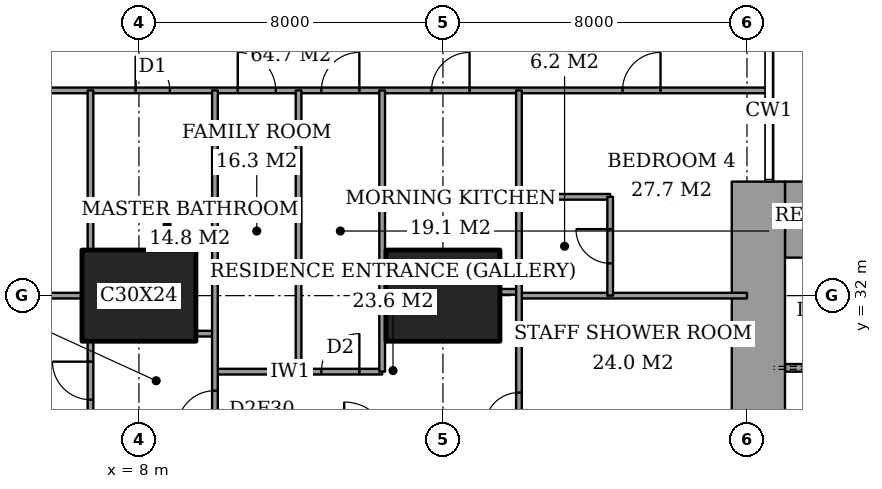
"""IFC4 building model, lengths in metres.
Left out: names, types, materials, properties, quantities, classifications, styles, units other than length and angle.
Written with IfcOpenShell. Run it as: python <this file> out.ifc"""

import sys

from ifc_helpers import new_model, si_unit, direction, frame, frame_2d, origin, origin_2d, place, context, subcontext, project, spatial, rectangle, extrude, element, fill, save


model = new_model("IFC4")
c1 = context("Model", 3, precision=1e-05, world=origin(), true_north=direction((0.0, 1.0)))
c2 = subcontext(c1, "Body", "Model", "MODEL_VIEW")
j1 = project(units=[si_unit("LENGTHUNIT", "METRE"), si_unit("PLANEANGLEUNIT", "RADIAN")], contexts=[c1])
p1 = place(None, origin())
s1 = spatial("IfcSite", under=j1, at=p1, CompositionType="ELEMENT")
p2 = place(p1, origin())
s2 = spatial("IfcBuilding", under=s1, at=p2, CompositionType="ELEMENT")
p3 = place(p2, frame((0.0, 0.0, 185.8)))
s3 = spatial("IfcBuildingStorey", under=s2, at=p3, CompositionType="ELEMENT", Elevation=185.8)
for number, where, z_axis, x_axis in (
    (1, (8.0, 32.0, 0.0), (0.0, 0.0, 1.0), (1.0, 0.0, 0.0)),
    (2, (16.0, 32.0, 0.0), (0.0, 0.0, 1.0), (1.0, 0.0, 0.0)),
):
    element("IfcColumn", number, at=place(p3, frame(where, z_axis=z_axis, x_axis=x_axis)), inside=s3, PredefinedType="COLUMN", context=c2, shape_type="SweptSolid", body=[
        extrude(rectangle(XDim=3.0, YDim=2.4, at=origin_2d()), origin(), (0.0, 0.0, 1.0), 3.6),
    ])
p4 = place(p3, frame((25.0, 34.0, 0.0), z_axis=(0.0, 0.0, 1.0), x_axis=(1.0, 0.0, 0.0)))
e3 = element("IfcWall", 3, at=p4, inside=s3, PredefinedType="SHEAR", context=c2, shape_type="SweptSolid", body=[
    extrude(rectangle(XDim=3.15, YDim=2.0, at=frame_2d((1.575, 0.0))), origin(), (0.0, 0.0, 1.0), 3.6),
])
p5 = place(p3, frame((24.3, 23.15, 0.0), z_axis=(0.0, 0.0, 1.0), x_axis=(0.0, 1.0, 0.0)))
e4 = element("IfcWall", 4, at=p5, inside=s3, PredefinedType="SHEAR", context=c2, shape_type="SweptSolid", body=[
    extrude(rectangle(XDim=11.85, YDim=1.4, at=frame_2d((5.925, 0.0))), origin(), (0.0, 0.0, 1.0), 3.6),
])
p6 = place(p5, frame((0.75, 0.0, 0.0)))
e5 = element("IfcOpeningElement", 5, at=p6, cuts=e4, PredefinedType="OPENING", context=c2, shape_type="SweptSolid", body=[
    extrude(rectangle(XDim=1.8, YDim=2.4, at=frame_2d((0.9, 1.2))), frame((0.0, 0.71, 0.0), z_axis=(0.0, -1.0, 0.0), x_axis=(1.0, 0.0, 0.0)), (0.0, 0.0, 1.0), 1.42),
])
p7 = place(p3, frame((10.0, 30.0, 0.0), z_axis=(0.0, 0.0, 1.0), x_axis=(1.0, 0.0, 0.0)))
e6 = element("IfcWall", 6, at=p7, inside=s3, PredefinedType="PARTITIONING", context=c2, shape_type="SweptSolid", body=[
    extrude(rectangle(XDim=4.4, YDim=0.15, at=frame_2d((2.2, 0.0))), origin(), (0.0, 0.0, 1.0), 3.35),
])
p8 = place(p7, frame((2.8, 0.0, 0.0)))
e7 = element("IfcOpeningElement", 7, at=p8, cuts=e6, PredefinedType="OPENING", context=c2, shape_type="SweptSolid", body=[
    extrude(rectangle(XDim=1.0, YDim=2.1, at=frame_2d((0.5, 1.05))), frame((0.0, 0.085, 0.0), z_axis=(0.0, -1.0, 0.0), x_axis=(1.0, 0.0, 0.0)), (0.0, 0.0, 1.0), 0.17),
])
p9 = place(p3, frame((9.5, 31.0, 0.0), z_axis=(0.0, 0.0, 1.0), x_axis=(1.0, 0.0, 0.0)))
e8 = element("IfcWall", 8, at=p9, inside=s3, PredefinedType="PARTITIONING", context=c2, shape_type="SweptSolid", body=[
    extrude(rectangle(XDim=0.5, YDim=0.15, at=frame_2d((0.25, 0.0))), origin(), (0.0, 0.0, 1.0), 3.35),
])
p10 = place(p3, frame((1.25, 32.0, 0.0), z_axis=(0.0, 0.0, 1.0), x_axis=(1.0, 0.0, 0.0)))
e9 = element("IfcWall", 9, at=p10, inside=s3, PredefinedType="PARTITIONING", context=c2, shape_type="SweptSolid", body=[
    extrude(rectangle(XDim=5.25, YDim=0.15, at=frame_2d((2.625, 0.0))), origin(), (0.0, 0.0, 1.0), 2.634),
])
p11 = place(p3, frame((18.0, 32.0, 0.0), z_axis=(0.0, 0.0, 1.0), x_axis=(1.0, 0.0, 0.0)))
e10 = element("IfcWall", 10, at=p11, inside=s3, PredefinedType="PARTITIONING", context=c2, shape_type="SweptSolid", body=[
    extrude(rectangle(XDim=6.0, YDim=0.15, at=frame_2d((3.0, 0.0))), origin(), (0.0, 0.0, 1.0), 2.634),
])
p12 = place(p3, frame((17.5, 32.1, 0.0), z_axis=(0.0, 0.0, 1.0), x_axis=(1.0, 0.0, 0.0)))
e11 = element("IfcWall", 11, at=p12, inside=s3, PredefinedType="PARTITIONING", context=c2, shape_type="SweptSolid", body=[
    extrude(rectangle(XDim=0.5, YDim=0.15, at=frame_2d((0.25, 0.0))), origin(), (0.0, 0.0, 1.0), 2.634),
])
p13 = place(p3, frame((18.0, 34.6, 0.0), z_axis=(0.0, 0.0, 1.0), x_axis=(1.0, 0.0, 0.0)))
e12 = element("IfcWall", 12, at=p13, inside=s3, PredefinedType="PARTITIONING", context=c2, shape_type="SweptSolid", body=[
    extrude(rectangle(XDim=2.4, YDim=0.15, at=frame_2d((1.2, 0.0))), origin(), (0.0, 0.0, 1.0), 3.35),
])
p14 = place(p3, frame((-0.45, 37.4, 0.0), z_axis=(0.0, 0.0, 1.0), x_axis=(1.0, 0.0, 0.0)))
e13 = element("IfcWall", 13, at=p14, inside=s3, PredefinedType="PARTITIONING", context=c2, shape_type="SweptSolid", body=[
    extrude(rectangle(XDim=25.011, YDim=0.15, at=frame_2d((12.505, 0.0))), origin(), (0.0, 0.0, 1.0), 3.35),
])
p15 = place(p14, frame((13.25, 0.0, 0.0)))
e14 = element("IfcOpeningElement", 14, at=p15, cuts=e13, PredefinedType="OPENING", context=c2, shape_type="SweptSolid", body=[
    extrude(rectangle(XDim=1.0, YDim=2.1, at=frame_2d((0.5, 1.05))), frame((0.0, 0.085, 0.0), z_axis=(0.0, -1.0, 0.0), x_axis=(1.0, 0.0, 0.0)), (0.0, 0.0, 1.0), 0.17),
])
p16 = place(p14, frame((3.087, 0.0, 0.0)))
e15 = element("IfcOpeningElement", 15, at=p16, cuts=e13, PredefinedType="OPENING", context=c2, shape_type="SweptSolid", body=[
    extrude(rectangle(XDim=1.0, YDim=2.1, at=frame_2d((0.5, 1.05))), frame((0.0, 0.085, 0.0), z_axis=(0.0, -1.0, 0.0), x_axis=(1.0, 0.0, 0.0)), (0.0, 0.0, 1.0), 0.17),
])
p17 = place(p14, frame((8.363, 0.0, 0.0)))
e16 = element("IfcOpeningElement", 16, at=p17, cuts=e13, PredefinedType="OPENING", context=c2, shape_type="SweptSolid", body=[
    extrude(rectangle(XDim=0.9, YDim=2.1, at=frame_2d((0.45, 1.05))), frame((0.0, 0.085, 0.0), z_axis=(0.0, -1.0, 0.0), x_axis=(1.0, 0.0, 0.0)), (0.0, 0.0, 1.0), 0.17),
])
p18 = place(p14, frame((11.05, 0.0, 0.0)))
e17 = element("IfcOpeningElement", 17, at=p18, cuts=e13, PredefinedType="OPENING", context=c2, shape_type="SweptSolid", body=[
    extrude(rectangle(XDim=1.0, YDim=2.1, at=frame_2d((0.5, 1.05))), frame((0.0, 0.085, 0.0), z_axis=(0.0, -1.0, 0.0), x_axis=(1.0, 0.0, 0.0)), (0.0, 0.0, 1.0), 0.17),
])
p19 = place(p14, frame((16.15, 0.0, 0.0)))
e18 = element("IfcOpeningElement", 18, at=p19, cuts=e13, PredefinedType="OPENING", context=c2, shape_type="SweptSolid", body=[
    extrude(rectangle(XDim=1.0, YDim=2.1, at=frame_2d((0.5, 1.05))), frame((0.0, 0.085, 0.0), z_axis=(0.0, -1.0, 0.0), x_axis=(1.0, 0.0, 0.0)), (0.0, 0.0, 1.0), 0.17),
])
p20 = place(p14, frame((21.175, 0.0, 0.0)))
e19 = element("IfcOpeningElement", 19, at=p20, cuts=e13, PredefinedType="OPENING", context=c2, shape_type="SweptSolid", body=[
    extrude(rectangle(XDim=1.0, YDim=2.1, at=frame_2d((0.5, 1.05))), frame((0.0, 0.085, 0.0), z_axis=(0.0, -1.0, 0.0), x_axis=(1.0, 0.0, 0.0)), (0.0, 0.0, 1.0), 0.17),
])
p21 = place(p3, frame((6.725, 28.35, 0.0), z_axis=(0.0, 0.0, 1.0), x_axis=(0.0, 1.0, 0.0)))
e20 = element("IfcWall", 20, at=p21, inside=s3, PredefinedType="PARTITIONING", context=c2, shape_type="SweptSolid", body=[
    extrude(rectangle(XDim=2.45, YDim=0.15, at=frame_2d((1.225, 0.0))), origin(), (0.0, 0.0, 1.0), 3.35),
])
p22 = place(p21, frame((0.913, 0.0, 0.0)))
e21 = element("IfcOpeningElement", 21, at=p22, cuts=e20, PredefinedType="OPENING", context=c2, shape_type="SweptSolid", body=[
    extrude(rectangle(XDim=1.0, YDim=2.1, at=frame_2d((0.5, 1.05))), frame((0.0, 0.085, 0.0), z_axis=(0.0, -1.0, 0.0), x_axis=(1.0, 0.0, 0.0)), (0.0, 0.0, 1.0), 0.17),
])
p23 = place(p3, frame((6.725, 33.2, 0.0), z_axis=(0.0, 0.0, 1.0), x_axis=(0.0, 1.0, 0.0)))
e22 = element("IfcWall", 22, at=p23, inside=s3, PredefinedType="PARTITIONING", context=c2, shape_type="SweptSolid", body=[
    extrude(rectangle(XDim=4.2, YDim=0.15, at=frame_2d((2.1, 0.0))), origin(), (0.0, 0.0, 1.0), 3.35),
])
p24 = place(p3, frame((10.0, 28.0, 0.0), z_axis=(0.0, 0.0, 1.0), x_axis=(0.0, 1.0, 0.0)))
e23 = element("IfcWall", 23, at=p24, inside=s3, PredefinedType="PARTITIONING", context=c2, shape_type="SweptSolid", body=[
    extrude(rectangle(XDim=9.4, YDim=0.15, at=frame_2d((4.7, 0.0))), origin(), (0.0, 0.0, 1.0), 3.35),
])
p25 = place(p24, frame((0.5, 0.0, 0.0)))
e24 = element("IfcOpeningElement", 24, at=p25, cuts=e23, PredefinedType="OPENING", context=c2, shape_type="SweptSolid", body=[
    extrude(rectangle(XDim=1.0, YDim=2.1, at=frame_2d((0.5, 1.05))), frame((0.0, 0.085, 0.0), z_axis=(0.0, -1.0, 0.0), x_axis=(1.0, 0.0, 0.0)), (0.0, 0.0, 1.0), 0.17),
])
for number, where, z_axis, x_axis in (
    (25, (12.2, 30.0, 0.0), (0.0, 0.0, 1.0), (0.0, 1.0, 0.0)),
    (26, (14.4, 30.0, 0.0), (0.0, 0.0, 1.0), (0.0, 1.0, 0.0)),
):
    element("IfcWall", number, at=place(p3, frame(where, z_axis=z_axis, x_axis=x_axis)), inside=s3, PredefinedType="PARTITIONING", context=c2, shape_type="SweptSolid", body=[
        extrude(rectangle(XDim=7.4, YDim=0.15, at=frame_2d((3.7, 0.0))), origin(), (0.0, 0.0, 1.0), 3.35),
    ])
p26 = place(p3, frame((18.0, 28.0, 0.0), z_axis=(0.0, 0.0, 1.0), x_axis=(0.0, 1.0, 0.0)))
e27 = element("IfcWall", 27, at=p26, inside=s3, PredefinedType="PARTITIONING", context=c2, shape_type="SweptSolid", body=[
    extrude(rectangle(XDim=9.4, YDim=0.15, at=frame_2d((4.7, 0.0))), origin(), (0.0, 0.0, 1.0), 3.35),
])
p27 = place(p26, frame((0.55, 0.0, 0.0)))
e28 = element("IfcOpeningElement", 28, at=p27, cuts=e27, PredefinedType="OPENING", context=c2, shape_type="SweptSolid", body=[
    extrude(rectangle(XDim=0.9, YDim=2.1, at=frame_2d((0.45, 1.05))), frame((0.0, 0.085, 0.0), z_axis=(0.0, -1.0, 0.0), x_axis=(1.0, 0.0, 0.0)), (0.0, 0.0, 1.0), 0.17),
])
p28 = place(p3, frame((20.4, 32.0, 0.0), z_axis=(0.0, 0.0, 1.0), x_axis=(0.0, 1.0, 0.0)))
e29 = element("IfcWall", 29, at=p28, inside=s3, PredefinedType="PARTITIONING", context=c2, shape_type="SweptSolid", body=[
    extrude(rectangle(XDim=2.6, YDim=0.15, at=frame_2d((1.3, 0.0))), origin(), (0.0, 0.0, 1.0), 3.35),
])
p29 = place(p28, frame((0.85, 0.0, 0.0)))
e30 = element("IfcOpeningElement", 30, at=p29, cuts=e29, PredefinedType="OPENING", context=c2, shape_type="SweptSolid", body=[
    extrude(rectangle(XDim=0.9, YDim=2.1, at=frame_2d((0.45, 1.05))), frame((0.0, 0.085, 0.0), z_axis=(0.0, -1.0, 0.0), x_axis=(1.0, 0.0, 0.0)), (0.0, 0.0, 1.0), 0.17),
])
p30 = place(p3, frame((25.0, 30.1, 0.0), z_axis=(0.0, 0.0, 1.0), x_axis=(1.0, 0.0, 0.0)))
e31 = element("IfcWall", 31, at=p30, inside=s3, PredefinedType="PARTITIONING", context=c2, shape_type="SweptSolid", body=[
    extrude(rectangle(XDim=12.7, YDim=0.2, at=frame_2d((6.35, 0.0))), origin(), (0.0, 0.0, 1.0), 3.6),
])
p31 = place(p30, frame((4.25, 0.0, 0.0)))
e32 = element("IfcOpeningElement", 32, at=p31, cuts=e31, PredefinedType="OPENING", context=c2, shape_type="SweptSolid", body=[
    extrude(rectangle(XDim=1.1, YDim=2.1, at=frame_2d((0.55, 1.05))), frame((0.0, 0.11, 0.0), z_axis=(0.0, -1.0, 0.0), x_axis=(1.0, 0.0, 0.0)), (0.0, 0.0, 1.0), 0.22),
])
p32 = place(p30, frame((7.45, 0.0, 0.0)))
e33 = element("IfcOpeningElement", 33, at=p32, cuts=e31, PredefinedType="OPENING", context=c2, shape_type="SweptSolid", body=[
    extrude(rectangle(XDim=1.1, YDim=2.1, at=frame_2d((0.55, 1.05))), frame((0.0, 0.11, 0.0), z_axis=(0.0, -1.0, 0.0), x_axis=(1.0, 0.0, 0.0)), (0.0, 0.0, 1.0), 0.22),
])
p33 = place(p30, frame((10.65, 0.0, 0.0)))
e34 = element("IfcOpeningElement", 34, at=p33, cuts=e31, PredefinedType="OPENING", context=c2, shape_type="SweptSolid", body=[
    extrude(rectangle(XDim=1.1, YDim=2.1, at=frame_2d((0.55, 1.05))), frame((0.0, 0.11, 0.0), z_axis=(0.0, -1.0, 0.0), x_axis=(1.0, 0.0, 0.0)), (0.0, 0.0, 1.0), 0.22),
])
p34 = place(p30, frame((0.9, 0.0, 0.0)))
e35 = element("IfcOpeningElement", 35, at=p34, cuts=e31, PredefinedType="OPENING", context=c2, shape_type="SweptSolid", body=[
    extrude(rectangle(XDim=1.2, YDim=2.1, at=frame_2d((0.6, 1.05))), frame((0.0, 0.11, 0.0), z_axis=(0.0, -1.0, 0.0), x_axis=(1.0, 0.0, 0.0)), (0.0, 0.0, 1.0), 0.22),
])
p35 = place(p15, origin())
e36 = element("IfcDoor", 36, at=p35, inside=s3, OperationType="SINGLE_SWING_LEFT", PredefinedType="DOOR", context=c2, shape_type="SweptSolid", body=[
    extrude(rectangle(XDim=1.0, YDim=2.1, at=frame_2d((0.5, 1.05))), frame((0.0, 0.025, 0.0), z_axis=(0.0, -1.0, 0.0), x_axis=(1.0, 0.0, 0.0)), (0.0, 0.0, 1.0), 0.05),
])
fill(e14, e36)
p36 = place(p22, origin())
e37 = element("IfcDoor", 37, at=p36, inside=s3, OperationType="SINGLE_SWING_LEFT", PredefinedType="DOOR", context=c2, shape_type="SweptSolid", body=[
    extrude(rectangle(XDim=1.0, YDim=2.1, at=frame_2d((0.5, 1.05))), frame((0.0, 0.025, 0.0), z_axis=(0.0, -1.0, 0.0), x_axis=(1.0, 0.0, 0.0)), (0.0, 0.0, 1.0), 0.05),
])
fill(e21, e37)
p37 = place(p17, origin())
e38 = element("IfcDoor", 38, at=p37, inside=s3, OperationType="SINGLE_SWING_RIGHT", PredefinedType="DOOR", context=c2, shape_type="SweptSolid", body=[
    extrude(rectangle(XDim=0.9, YDim=2.1, at=frame_2d((0.45, 1.05))), frame((0.0, 0.025, 0.0), z_axis=(0.0, -1.0, 0.0), x_axis=(1.0, 0.0, 0.0)), (0.0, 0.0, 1.0), 0.05),
])
fill(e16, e38)
p38 = place(p25, origin())
e39 = element("IfcDoor", 39, at=p38, inside=s3, OperationType="SINGLE_SWING_RIGHT", PredefinedType="DOOR", context=c2, shape_type="SweptSolid", body=[
    extrude(rectangle(XDim=1.0, YDim=2.1, at=frame_2d((0.5, 1.05))), frame((0.0, 0.025, 0.0), z_axis=(0.0, -1.0, 0.0), x_axis=(1.0, 0.0, 0.0)), (0.0, 0.0, 1.0), 0.05),
])
fill(e24, e39)
p39 = place(p18, origin())
e40 = element("IfcDoor", 40, at=p39, inside=s3, OperationType="SINGLE_SWING_RIGHT", PredefinedType="DOOR", context=c2, shape_type="SweptSolid", body=[
    extrude(rectangle(XDim=1.0, YDim=2.1, at=frame_2d((0.5, 1.05))), frame((0.0, 0.025, 0.0), z_axis=(0.0, -1.0, 0.0), x_axis=(1.0, 0.0, 0.0)), (0.0, 0.0, 1.0), 0.05),
])
fill(e17, e40)
p40 = place(p8, origin())
e41 = element("IfcDoor", 41, at=p40, inside=s3, OperationType="SINGLE_SWING_LEFT", PredefinedType="DOOR", context=c2, shape_type="SweptSolid", body=[
    extrude(rectangle(XDim=1.0, YDim=2.1, at=frame_2d((0.5, 1.05))), frame((0.0, 0.025, 0.0), z_axis=(0.0, -1.0, 0.0), x_axis=(1.0, 0.0, 0.0)), (0.0, 0.0, 1.0), 0.05),
])
fill(e7, e41)
p41 = place(p19, origin())
e42 = element("IfcDoor", 42, at=p41, inside=s3, OperationType="SINGLE_SWING_LEFT", PredefinedType="DOOR", context=c2, shape_type="SweptSolid", body=[
    extrude(rectangle(XDim=1.0, YDim=2.1, at=frame_2d((0.5, 1.05))), frame((0.0, 0.025, 0.0), z_axis=(0.0, -1.0, 0.0), x_axis=(1.0, 0.0, 0.0)), (0.0, 0.0, 1.0), 0.05),
])
fill(e18, e42)
p42 = place(p29, origin())
e43 = element("IfcDoor", 43, at=p42, inside=s3, OperationType="SINGLE_SWING_LEFT", PredefinedType="DOOR", context=c2, shape_type="SweptSolid", body=[
    extrude(rectangle(XDim=0.9, YDim=2.1, at=frame_2d((0.45, 1.05))), frame((0.0, 0.025, 0.0), z_axis=(0.0, -1.0, 0.0), x_axis=(1.0, 0.0, 0.0)), (0.0, 0.0, 1.0), 0.05),
])
fill(e30, e43)
p43 = place(p20, origin())
e44 = element("IfcDoor", 44, at=p43, inside=s3, OperationType="SINGLE_SWING_LEFT", PredefinedType="DOOR", context=c2, shape_type="SweptSolid", body=[
    extrude(rectangle(XDim=1.0, YDim=2.1, at=frame_2d((0.5, 1.05))), frame((0.0, 0.025, 0.0), z_axis=(0.0, -1.0, 0.0), x_axis=(1.0, 0.0, 0.0)), (0.0, 0.0, 1.0), 0.05),
])
fill(e19, e44)
p44 = place(p27, origin())
e45 = element("IfcDoor", 45, at=p44, inside=s3, OperationType="SINGLE_SWING_RIGHT", PredefinedType="DOOR", context=c2, shape_type="SweptSolid", body=[
    extrude(rectangle(XDim=0.9, YDim=2.1, at=frame_2d((0.45, 1.05))), frame((0.0, 0.025, 0.0), z_axis=(0.0, -1.0, 0.0), x_axis=(1.0, 0.0, 0.0)), (0.0, 0.0, 1.0), 0.05),
])
fill(e28, e45)
save(model, sys.argv[1])
